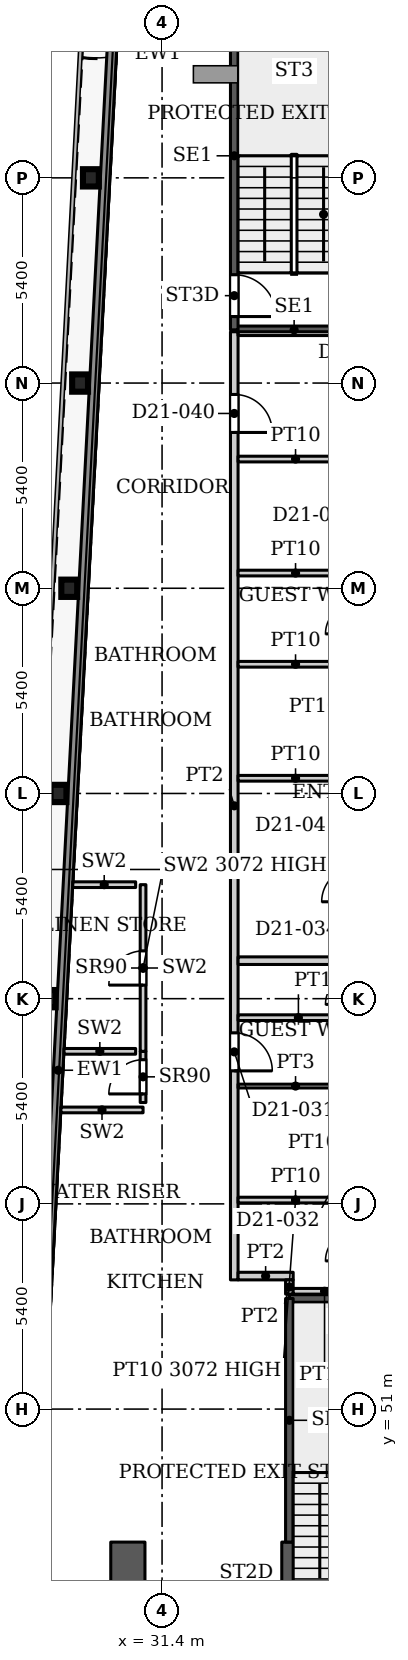
"""IFC4 building model, lengths in metres.
Left out: names, types, materials, properties, quantities, classifications, styles, units other than length and angle.
Written with IfcOpenShell. Run it as: python <this file> out.ifc"""

import sys

from ifc_helpers import new_model, si_unit, direction, frame, frame_2d, origin, origin_2d, place, context, subcontext, project, spatial, rectangle, i_section, extrude, source, transform, mapped, element, fill, save


model = new_model("IFC4")
c1 = context("Model", 3, precision=1e-05, world=origin(), true_north=direction((0.0, 1.0)))
c2 = subcontext(c1, "Body", "Model", "MODEL_VIEW")
j1 = project(units=[si_unit("LENGTHUNIT", "METRE"), si_unit("PLANEANGLEUNIT", "RADIAN")], contexts=[c1])
p1 = place(None, origin())
s1 = spatial("IfcSite", under=j1, at=p1, CompositionType="ELEMENT")
p2 = place(p1, origin())
s2 = spatial("IfcBuilding", under=s1, at=p2, CompositionType="ELEMENT")
p3 = place(p2, frame((0.0, 0.0, 94.1)))
s3 = spatial("IfcBuildingStorey", under=s2, at=p3, CompositionType="ELEMENT", Elevation=94.1)
for number, where, z_axis, x_axis in (
    (1, (28.39, 61.8, 0.0), (0.0, 0.0, 1.0), (1.0, 0.0, 0.0)),
    (2, (28.674, 67.2, 0.0), (0.0, 0.0, 1.0), (1.0, 0.0, 0.0)),
    (3, (28.958, 72.6, 0.0), (0.0, 0.0, 1.0), (1.0, 0.0, 0.0)),
    (4, (29.243, 78.0, 0.0), (0.0, 0.0, 1.0), (1.0, 0.0, 0.0)),
    (5, (29.527, 83.4, 0.0), (0.0, 0.0, 1.0), (1.0, 0.0, 0.0)),
):
    element("IfcColumn", number, at=place(p3, frame(where, z_axis=z_axis, x_axis=x_axis)), inside=s3, PredefinedType="COLUMN", context=c2, shape_type="SweptSolid", body=[
        extrude(i_section(OverallWidth=0.418, OverallDepth=0.455, WebThickness=0.042, FlangeThickness=0.068, FilletRadius=0.014, at=origin_2d()), origin(), (0.0, 0.0, 1.0), 3.9),
    ])
p4 = place(p3, frame((34.75, 29.05, 0.0), z_axis=(0.0, 0.0, 1.0), x_axis=(0.0, 1.0, 0.0)))
e6 = element("IfcWall", 6, at=p4, inside=s3, PredefinedType="SHEAR", context=c2, shape_type="SweptSolid", body=[
    extrude(rectangle(XDim=18.45, YDim=0.4, at=frame_2d((9.225, 0.0))), origin(), (0.0, 0.0, 1.0), 3.9),
])
p5 = place(p4, frame((8.025, 0.0, 0.0)))
e7 = element("IfcOpeningElement", 7, at=p5, cuts=e6, PredefinedType="OPENING", context=c2, shape_type="SweptSolid", body=[
    extrude(rectangle(XDim=1.1, YDim=2.2, at=frame_2d((0.55, 1.1))), frame((0.0, 0.21, 0.0), z_axis=(0.0, -1.0, 0.0), x_axis=(1.0, 0.0, 0.0)), (0.0, 0.0, 1.0), 0.42),
])
p6 = place(p4, frame((10.875, 0.0, 0.0)))
e8 = element("IfcOpeningElement", 8, at=p6, cuts=e6, PredefinedType="OPENING", context=c2, shape_type="SweptSolid", body=[
    extrude(rectangle(XDim=1.1, YDim=2.2, at=frame_2d((0.55, 1.1))), frame((0.0, 0.21, 0.0), z_axis=(0.0, -1.0, 0.0), x_axis=(1.0, 0.0, 0.0)), (0.0, 0.0, 1.0), 0.42),
])
p7 = place(p4, frame((13.725, 0.0, 0.0)))
e9 = element("IfcOpeningElement", 9, at=p7, cuts=e6, PredefinedType="OPENING", context=c2, shape_type="SweptSolid", body=[
    extrude(rectangle(XDim=1.1, YDim=2.2, at=frame_2d((0.55, 1.1))), frame((0.0, 0.21, 0.0), z_axis=(0.0, -1.0, 0.0), x_axis=(1.0, 0.0, 0.0)), (0.0, 0.0, 1.0), 0.42),
])
p8 = place(p4, frame((15.95, 0.0, 0.0)))
e10 = element("IfcOpeningElement", 10, at=p8, cuts=e6, PredefinedType="OPENING", context=c2, shape_type="SweptSolid", body=[
    extrude(rectangle(XDim=1.1, YDim=2.2, at=frame_2d((0.55, 1.1))), frame((0.0, 0.21, 0.0), z_axis=(0.0, -1.0, 0.0), x_axis=(1.0, 0.0, 0.0)), (0.0, 0.0, 1.0), 0.42),
])
p9 = place(p3, frame((30.5, 29.05, 0.0), z_axis=(0.0, 0.0, 1.0), x_axis=(0.0, 1.0, 0.0)))
e11 = element("IfcWall", 11, at=p9, inside=s3, PredefinedType="SHEAR", context=c2, shape_type="SweptSolid", body=[
    extrude(rectangle(XDim=18.45, YDim=0.9, at=frame_2d((9.225, 0.0))), origin(), (0.0, 0.0, 1.0), 3.9),
])
p10 = place(p9, frame((1.5, 0.0, 0.0)))
e12 = element("IfcOpeningElement", 12, at=p10, cuts=e11, PredefinedType="OPENING", context=c2, shape_type="SweptSolid", body=[
    extrude(rectangle(XDim=0.9, YDim=2.2, at=frame_2d((0.45, 1.1))), frame((0.0, 0.46, 0.0), z_axis=(0.0, -1.0, 0.0), x_axis=(1.0, 0.0, 0.0)), (0.0, 0.0, 1.0), 0.92),
])
p11 = place(p9, frame((6.03, 0.0, 0.0)))
e13 = element("IfcOpeningElement", 13, at=p11, cuts=e11, PredefinedType="OPENING", context=c2, shape_type="SweptSolid", body=[
    extrude(rectangle(XDim=0.9, YDim=2.2, at=frame_2d((0.45, 1.1))), frame((0.0, 0.46, 0.0), z_axis=(0.0, -1.0, 0.0), x_axis=(1.0, 0.0, 0.0)), (0.0, 0.0, 1.0), 0.92),
])
p12 = place(p9, frame((9.7, 0.0, 0.0)))
e14 = element("IfcOpeningElement", 14, at=p12, cuts=e11, PredefinedType="OPENING", context=c2, shape_type="SweptSolid", body=[
    extrude(rectangle(XDim=0.9, YDim=2.2, at=frame_2d((0.45, 1.1))), frame((0.0, 0.46, 0.0), z_axis=(0.0, -1.0, 0.0), x_axis=(1.0, 0.0, 0.0)), (0.0, 0.0, 1.0), 0.92),
])
p13 = place(p3, frame((27.195, 31.969, 0.0), z_axis=(0.0, 0.0, 1.0), x_axis=(0.052559748861, 0.998617781135, 0.0)))
e15 = element("IfcWall", 15, at=p13, inside=s3, PredefinedType="SOLIDWALL", context=c2, shape_type="SweptSolid", body=[
    extrude(rectangle(XDim=55.972, YDim=0.25, at=frame_2d((27.986, 0.0))), origin(), (0.0, 0.0, 1.0), 3.75),
])
p14 = place(p3, frame((34.75, 53.91, 0.0), z_axis=(0.0, 0.0, 1.0), x_axis=(1.0, 0.0, 0.0)))
e16 = element("IfcWall", 16, at=p14, inside=s3, PredefinedType="SHEAR", context=c2, shape_type="SweptSolid", body=[
    extrude(rectangle(XDim=3.15, YDim=0.2, at=frame_2d((1.575, 0.0))), origin(), (0.0, 0.0, 1.0), 3.9),
])
p15 = place(p3, frame((34.75, 47.5, 0.0), z_axis=(0.0, 0.0, 1.0), x_axis=(0.0, 1.0, 0.0)))
e17 = element("IfcWall", 17, at=p15, inside=s3, PredefinedType="SHEAR", context=c2, shape_type="SweptSolid", body=[
    extrude(rectangle(XDim=6.41, YDim=0.2, at=frame_2d((3.205, 0.0))), origin(), (0.0, 0.0, 1.0), 3.9),
])
p16 = place(p3, frame((33.3, 79.4, 0.0), z_axis=(0.0, 0.0, 1.0), x_axis=(1.0, 0.0, 0.0)))
e18 = element("IfcWall", 18, at=p16, inside=s3, PredefinedType="SHEAR", context=c2, shape_type="SweptSolid", body=[
    extrude(rectangle(XDim=3.15, YDim=0.2, at=frame_2d((1.575, 0.0))), origin(), (0.0, 0.0, 1.0), 3.9),
])
p17 = place(p3, frame((33.3, 79.4, 0.0), z_axis=(0.0, 0.0, 1.0), x_axis=(0.0, 1.0, 0.0)))
e19 = element("IfcWall", 19, at=p17, inside=s3, PredefinedType="SHEAR", context=c2, shape_type="SweptSolid", body=[
    extrude(rectangle(XDim=9.16, YDim=0.2, at=frame_2d((4.58, 0.0))), origin(), (0.0, 0.0, 1.0), 3.9),
])
p18 = place(p17, frame((0.35, 0.0, 0.0)))
e20 = element("IfcOpeningElement", 20, at=p18, cuts=e19, PredefinedType="OPENING", context=c2, shape_type="SweptSolid", body=[
    extrude(rectangle(XDim=1.1, YDim=2.2, at=frame_2d((0.55, 1.1))), frame((0.0, 0.11, 0.0), z_axis=(0.0, -1.0, 0.0), x_axis=(1.0, 0.0, 0.0)), (0.0, 0.0, 1.0), 0.22),
])
p19 = place(p3, frame((28.739, 58.872, 0.0), z_axis=(0.0, 0.0, 1.0), x_axis=(1.0, 0.0, 0.0)))
e21 = element("IfcWall", 21, at=p19, inside=s3, PredefinedType="PARTITIONING", context=c2, shape_type="SweptSolid", body=[
    extrude(rectangle(XDim=2.161, YDim=0.15, at=frame_2d((1.081, 0.0))), origin(), (0.0, 0.0, 1.0), 3.9),
])
p20 = place(p3, frame((30.9, 59.067, 0.0), z_axis=(0.0, 0.0, 1.0), x_axis=(0.0, 1.0, 0.0)))
e22 = element("IfcWall", 22, at=p20, inside=s3, PredefinedType="PARTITIONING", context=c2, shape_type="SweptSolid", body=[
    extrude(rectangle(XDim=1.347, YDim=0.15, at=frame_2d((0.674, 0.0))), origin(), (0.0, 0.0, 1.0), 3.9),
])
p21 = place(p20, frame((0.226, 0.0, 0.0)))
e23 = element("IfcOpeningElement", 23, at=p21, cuts=e22, PredefinedType="OPENING", context=c2, shape_type="SweptSolid", body=[
    extrude(rectangle(XDim=0.9, YDim=2.2, at=frame_2d((0.45, 1.1))), frame((0.0, 0.085, 0.0), z_axis=(0.0, -1.0, 0.0), x_axis=(1.0, 0.0, 0.0)), (0.0, 0.0, 1.0), 0.17),
])
p22 = place(p3, frame((28.82, 60.414, 0.0), z_axis=(0.0, 0.0, 1.0), x_axis=(1.0, 0.0, 0.0)))
e24 = element("IfcWall", 24, at=p22, inside=s3, PredefinedType="PARTITIONING", context=c2, shape_type="SweptSolid", body=[
    extrude(rectangle(XDim=1.885, YDim=0.15, at=frame_2d((0.942, 0.0))), origin(), (0.0, 0.0, 1.0), 3.9),
])
p23 = place(p3, frame((30.9, 60.414, 0.0), z_axis=(0.0, 0.0, 1.0), x_axis=(0.0, 1.0, 0.0)))
e25 = element("IfcWall", 25, at=p23, inside=s3, PredefinedType="PARTITIONING", context=c2, shape_type="SweptSolid", body=[
    extrude(rectangle(XDim=4.386, YDim=0.15, at=frame_2d((2.193, 0.0))), origin(), (0.0, 0.0, 1.0), 3.072),
])
p24 = place(p23, frame((1.743, 0.0, 0.0)))
e26 = element("IfcOpeningElement", 26, at=p24, cuts=e25, PredefinedType="OPENING", context=c2, shape_type="SweptSolid", body=[
    extrude(rectangle(XDim=0.9, YDim=2.2, at=frame_2d((0.45, 1.1))), frame((0.0, 0.085, 0.0), z_axis=(0.0, -1.0, 0.0), x_axis=(1.0, 0.0, 0.0)), (0.0, 0.0, 1.0), 0.17),
])
p25 = place(p3, frame((29.051, 64.8, 0.0), z_axis=(0.0, 0.0, 1.0), x_axis=(1.0, 0.0, 0.0)))
e27 = element("IfcWall", 27, at=p25, inside=s3, PredefinedType="PARTITIONING", context=c2, shape_type="SweptSolid", body=[
    extrude(rectangle(XDim=1.654, YDim=0.15, at=frame_2d((0.827, 0.0))), origin(), (0.0, 0.0, 1.0), 3.9),
])
p26 = place(p3, frame((33.3, 54.4, 0.0), z_axis=(0.0, 0.0, 1.0), x_axis=(0.0, 1.0, 0.0)))
e28 = element("IfcWall", 28, at=p26, inside=s3, PredefinedType="PARTITIONING", context=c2, shape_type="SweptSolid", body=[
    extrude(rectangle(XDim=24.95, YDim=0.2, at=frame_2d((12.475, 0.0))), origin(), (0.0, 0.0, 1.0), 3.6),
])
p27 = place(p26, frame((5.5, 0.0, 0.0)))
e29 = element("IfcOpeningElement", 29, at=p27, cuts=e28, PredefinedType="OPENING", context=c2, shape_type="SweptSolid", body=[
    extrude(rectangle(XDim=1.0, YDim=2.1, at=frame_2d((0.5, 1.05))), frame((0.0, 0.11, 0.0), z_axis=(0.0, -1.0, 0.0), x_axis=(1.0, 0.0, 0.0)), (0.0, 0.0, 1.0), 0.22),
])
p28 = place(p26, frame((22.3, 0.0, 0.0)))
e30 = element("IfcOpeningElement", 30, at=p28, cuts=e28, PredefinedType="OPENING", context=c2, shape_type="SweptSolid", body=[
    extrude(rectangle(XDim=1.0, YDim=2.1, at=frame_2d((0.5, 1.05))), frame((0.0, 0.11, 0.0), z_axis=(0.0, -1.0, 0.0), x_axis=(1.0, 0.0, 0.0)), (0.0, 0.0, 1.0), 0.22),
])
p29 = place(p3, frame((33.4, 54.5, 0.0), z_axis=(0.0, 0.0, 1.0), x_axis=(1.0, 0.0, 0.0)))
e31 = element("IfcWall", 31, at=p29, inside=s3, PredefinedType="PARTITIONING", context=c2, shape_type="SweptSolid", body=[
    extrude(rectangle(XDim=1.45, YDim=0.2, at=frame_2d((0.725, 0.0))), origin(), (0.0, 0.0, 1.0), 3.6),
])
p30 = place(p3, frame((33.4, 56.5, 0.0), z_axis=(0.0, 0.0, 1.0), x_axis=(1.0, 0.0, 0.0)))
e32 = element("IfcWall", 32, at=p30, inside=s3, PredefinedType="PARTITIONING", context=c2, shape_type="SweptSolid", body=[
    extrude(rectangle(XDim=3.025, YDim=0.15, at=frame_2d((1.513, 0.0))), origin(), (0.0, 0.0, 1.0), 3.072),
])
p31 = place(p3, frame((33.4, 59.5, 0.0), z_axis=(0.0, 0.0, 1.0), x_axis=(1.0, 0.0, 0.0)))
e33 = element("IfcWall", 33, at=p31, inside=s3, PredefinedType="PARTITIONING", context=c2, shape_type="SweptSolid", body=[
    extrude(rectangle(XDim=3.025, YDim=0.1, at=frame_2d((1.513, 0.0))), origin(), (0.0, 0.0, 1.0), 3.6),
])
p32 = place(p3, frame((33.4, 61.3, 0.0), z_axis=(0.0, 0.0, 1.0), x_axis=(1.0, 0.0, 0.0)))
e34 = element("IfcWall", 34, at=p32, inside=s3, PredefinedType="PARTITIONING", context=c2, shape_type="SweptSolid", body=[
    extrude(rectangle(XDim=3.175, YDim=0.15, at=frame_2d((1.587, 0.0))), origin(), (0.0, 0.0, 1.0), 3.6),
])
p33 = place(p3, frame((33.4, 62.8, 0.0), z_axis=(0.0, 0.0, 1.0), x_axis=(1.0, 0.0, 0.0)))
e35 = element("IfcWall", 35, at=p33, inside=s3, PredefinedType="PARTITIONING", context=c2, shape_type="SweptSolid", body=[
    extrude(rectangle(XDim=12.5, YDim=0.2, at=frame_2d((6.25, 0.0))), origin(), (0.0, 0.0, 1.0), 3.6),
])
for number, where, z_axis, x_axis in (
    (36, (33.4, 67.6, 0.0), (0.0, 0.0, 1.0), (1.0, 0.0, 0.0)),
    (37, (33.4, 70.6, 0.0), (0.0, 0.0, 1.0), (1.0, 0.0, 0.0)),
    (38, (33.4, 73.0, 0.0), (0.0, 0.0, 1.0), (1.0, 0.0, 0.0)),
    (39, (33.4, 76.0, 0.0), (0.0, 0.0, 1.0), (1.0, 0.0, 0.0)),
):
    element("IfcWall", number, at=place(p3, frame(where, z_axis=z_axis, x_axis=x_axis)), inside=s3, PredefinedType="PARTITIONING", context=c2, shape_type="SweptSolid", body=[
        extrude(rectangle(XDim=3.025, YDim=0.15, at=frame_2d((1.513, 0.0))), origin(), (0.0, 0.0, 1.0), 3.6),
    ])
p34 = place(p3, frame((33.4, 79.3, 0.0), z_axis=(0.0, 0.0, 1.0), x_axis=(1.0, 0.0, 0.0)))
e40 = element("IfcWall", 40, at=p34, inside=s3, PredefinedType="PARTITIONING", context=c2, shape_type="SweptSolid", body=[
    extrude(rectangle(XDim=12.5, YDim=0.1, at=frame_2d((6.25, 0.0))), origin(), (0.0, 0.0, 1.0), 3.6),
])
p35 = place(p34, frame((3.053, 0.0, 0.0)))
e41 = element("IfcOpeningElement", 41, at=p35, cuts=e40, PredefinedType="OPENING", context=c2, shape_type="SweptSolid", body=[
    extrude(rectangle(XDim=0.9, YDim=2.1, at=frame_2d((0.45, 1.05))), frame((0.0, 0.06, 0.0), z_axis=(0.0, -1.0, 0.0), x_axis=(1.0, 0.0, 0.0)), (0.0, 0.0, 1.0), 0.12),
])
p36 = place(p3, frame((34.75, 54.025, 0.0), z_axis=(0.0, 0.0, 1.0), x_axis=(0.0, 1.0, 0.0)))
e42 = element("IfcWall", 42, at=p36, inside=s3, PredefinedType="PARTITIONING", context=c2, shape_type="SweptSolid", body=[
    extrude(rectangle(XDim=0.375, YDim=0.2, at=frame_2d((0.188, 0.0))), origin(), (0.0, 0.0, 1.0), 3.6),
])
p37 = place(p3, frame((34.85, 54.1, 0.0), z_axis=(0.0, 0.0, 1.0), x_axis=(1.0, 0.0, 0.0)))
e43 = element("IfcWall", 43, at=p37, inside=s3, PredefinedType="PARTITIONING", context=c2, shape_type="SweptSolid", body=[
    extrude(rectangle(XDim=1.65, YDim=0.15, at=frame_2d((0.825, 0.0))), origin(), (0.0, 0.0, 1.0), 3.6),
])
m1 = source(origin(), c2, "Body", "SweptSolid", [
    extrude(rectangle(XDim=0.9, YDim=2.2, at=frame_2d((0.45, 1.1))), frame((0.0, 0.025, 0.0), z_axis=(0.0, -1.0, 0.0), x_axis=(1.0, 0.0, 0.0)), (0.0, 0.0, 1.0), 0.05),
])
p38 = place(p21, origin())
e44 = element("IfcDoor", 44, at=p38, inside=s3, OperationType="SINGLE_SWING_LEFT", PredefinedType="DOOR", context=c2, shape_type="MappedRepresentation", body=[
    mapped(m1, transform((0.0, 0.0, 0.0), x_axis=(1.0, 0.0, 0.0), y_axis=(0.0, 1.0, 0.0), z_axis=(0.0, 0.0, 1.0), scale=1.0)),
])
fill(e23, e44)
p39 = place(p24, origin())
e45 = element("IfcDoor", 45, at=p39, inside=s3, OperationType="SINGLE_SWING_LEFT", PredefinedType="DOOR", context=c2, shape_type="MappedRepresentation", body=[
    mapped(m1, transform((0.0, 0.0, 0.0), x_axis=(1.0, 0.0, 0.0), y_axis=(0.0, 1.0, 0.0), z_axis=(0.0, 0.0, 1.0), scale=1.0)),
])
fill(e26, e45)
m2 = source(origin(), c2, "Body", "SweptSolid", [
    extrude(rectangle(XDim=1.1, YDim=2.2, at=frame_2d((0.55, 1.1))), frame((0.0, 0.025, 0.0), z_axis=(0.0, -1.0, 0.0), x_axis=(1.0, 0.0, 0.0)), (0.0, 0.0, 1.0), 0.05),
])
p40 = place(p18, origin())
e46 = element("IfcDoor", 46, at=p40, inside=s3, OperationType="SINGLE_SWING_RIGHT", PredefinedType="DOOR", context=c2, shape_type="MappedRepresentation", body=[
    mapped(m2, transform((0.0, 0.0, 0.0), x_axis=(1.0, 0.0, 0.0), y_axis=(0.0, 1.0, 0.0), z_axis=(0.0, 0.0, 1.0), scale=1.0)),
])
fill(e20, e46)
m3 = source(origin(), c2, "Body", "SweptSolid", [
    extrude(rectangle(XDim=1.0, YDim=2.1, at=frame_2d((0.5, 1.05))), frame((0.0, 0.025, 0.0), z_axis=(0.0, -1.0, 0.0), x_axis=(1.0, 0.0, 0.0)), (0.0, 0.0, 1.0), 0.05),
])
p41 = place(p27, origin())
e47 = element("IfcDoor", 47, at=p41, inside=s3, OperationType="SINGLE_SWING_RIGHT", PredefinedType="DOOR", context=c2, shape_type="MappedRepresentation", body=[
    mapped(m3, transform((0.0, 0.0, 0.0), x_axis=(1.0, 0.0, 0.0), y_axis=(0.0, 1.0, 0.0), z_axis=(0.0, 0.0, 1.0), scale=1.0)),
])
fill(e29, e47)
p42 = place(p28, origin())
e48 = element("IfcDoor", 48, at=p42, inside=s3, OperationType="SINGLE_SWING_RIGHT", PredefinedType="DOOR", context=c2, shape_type="MappedRepresentation", body=[
    mapped(m3, transform((0.0, 0.0, 0.0), x_axis=(1.0, 0.0, 0.0), y_axis=(0.0, 1.0, 0.0), z_axis=(0.0, 0.0, 1.0), scale=1.0)),
])
fill(e30, e48)
save(model, sys.argv[1])
